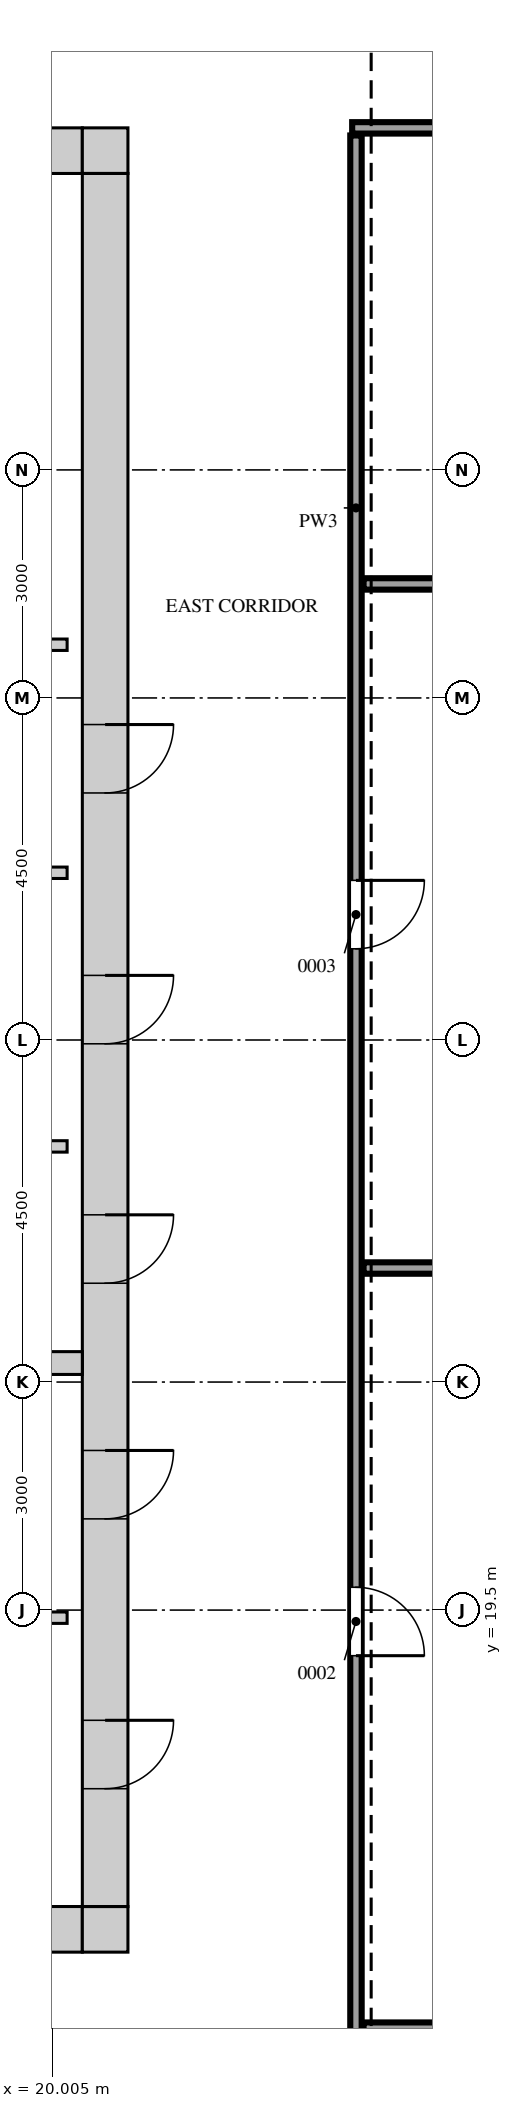
"""IFC4 building model, lengths in metres.
Left out: names, types, materials, properties, quantities, classifications, styles, units other than length and angle.
Written with IfcOpenShell. Run it as: python <this file> out.ifc"""

import sys

from ifc_helpers import new_model, si_unit, direction, frame, frame_2d, origin, place, context, subcontext, project, spatial, rectangle, extrude, source, transform, mapped, element, fill, save


model = new_model("IFC4")
c1 = context("Model", 3, precision=1e-05, world=origin(), true_north=direction((0.0, 1.0)))
c2 = subcontext(c1, "Body", "Model", "MODEL_VIEW")
j1 = project(units=[si_unit("LENGTHUNIT", "METRE"), si_unit("PLANEANGLEUNIT", "RADIAN")], contexts=[c1])
p1 = place(None, origin())
s1 = spatial("IfcSite", under=j1, at=p1, CompositionType="ELEMENT")
p2 = place(p1, origin())
s2 = spatial("IfcBuilding", under=s1, at=p2, CompositionType="ELEMENT")
p3 = place(p2, frame((0.0, 0.0, 334.7)))
s3 = spatial("IfcBuildingStorey", under=s2, at=p3, CompositionType="ELEMENT", Elevation=334.7)
m1 = source(origin(), c2, "Body", "SweptSolid", [
    extrude(rectangle(XDim=14.4, YDim=0.6, at=frame_2d((7.2, 0.0))), origin(), (0.0, 0.0, 1.0), 4.25),
])
p4 = place(p3, frame((6.0, 38.7, 0.0), z_axis=(0.0, 0.0, 1.0), x_axis=(1.0, 0.0, 0.0)))
e1 = element("IfcWall", 1, at=p4, inside=s3, PredefinedType="SHEAR", context=c2, shape_type="MappedRepresentation", body=[
    mapped(m1, transform((0.0, 0.0, 0.0))),
])
m2 = source(origin(), c2, "Body", "SweptSolid", [
    extrude(rectangle(XDim=0.9, YDim=2.1, at=frame_2d((0.45, 1.05))), frame((0.0, 0.31, 0.0), z_axis=(0.0, -1.0, 0.0), x_axis=(1.0, 0.0, 0.0)), (0.0, 0.0, 1.0), 0.62),
])
p5 = place(p4, frame((3.7, 0.0, 0.0)))
e2 = element("IfcOpeningElement", 2, at=p5, cuts=e1, PredefinedType="OPENING", context=c2, shape_type="MappedRepresentation", body=[
    mapped(m2, transform((0.0, 0.0, 0.0))),
])
p6 = place(p4, frame((10.4, 0.0, 0.0)))
e3 = element("IfcOpeningElement", 3, at=p6, cuts=e1, PredefinedType="OPENING", context=c2, shape_type="MappedRepresentation", body=[
    mapped(m2, transform((0.0, 0.0, 0.0))),
])
m3 = source(origin(), c2, "Body", "SweptSolid", [
    extrude(rectangle(XDim=0.6, YDim=0.6, at=frame_2d((0.3, 0.0))), origin(), (0.0, 0.0, 1.0), 4.25),
])
p7 = place(p3, frame((20.4, 38.7, 0.0), z_axis=(0.0, 0.0, 1.0), x_axis=(1.0, 0.0, 0.0)))
e4 = element("IfcWall", 4, at=p7, inside=s3, PredefinedType="SHEAR", context=c2, shape_type="MappedRepresentation", body=[
    mapped(m3, transform((0.0, 0.0, 0.0))),
])
p8 = place(p3, frame((6.0, 15.3, 0.0), z_axis=(0.0, 0.0, 1.0), x_axis=(1.0, 0.0, 0.0)))
e5 = element("IfcWall", 5, at=p8, inside=s3, PredefinedType="SHEAR", context=c2, shape_type="MappedRepresentation", body=[
    mapped(m1, transform((0.0, 0.0, 0.0))),
])
m4 = source(origin(), c2, "Body", "SweptSolid", [
    extrude(rectangle(XDim=1.2, YDim=2.1, at=frame_2d((0.6, 1.05))), frame((0.0, 0.31, 0.0), z_axis=(0.0, -1.0, 0.0), x_axis=(1.0, 0.0, 0.0)), (0.0, 0.0, 1.0), 0.62),
])
p9 = place(p8, frame((6.2, 0.0, 0.0)))
e6 = element("IfcOpeningElement", 6, at=p9, cuts=e5, PredefinedType="OPENING", context=c2, shape_type="MappedRepresentation", body=[
    mapped(m4, transform((0.0, 0.0, 0.0))),
])
p10 = place(p8, frame((2.85, 0.0, 0.0)))
e7 = element("IfcOpeningElement", 7, at=p10, cuts=e5, PredefinedType="OPENING", context=c2, shape_type="MappedRepresentation", body=[
    mapped(m4, transform((0.0, 0.0, 0.0))),
])
m5 = source(origin(), c2, "Body", "SweptSolid", [
    extrude(rectangle(XDim=1.0, YDim=2.1, at=frame_2d((0.5, 1.05))), frame((0.0, 0.31, 0.0), z_axis=(0.0, -1.0, 0.0), x_axis=(1.0, 0.0, 0.0)), (0.0, 0.0, 1.0), 0.62),
])
p11 = place(p8, frame((8.7, 0.0, 0.0)))
e8 = element("IfcOpeningElement", 8, at=p11, cuts=e5, PredefinedType="OPENING", context=c2, shape_type="MappedRepresentation", body=[
    mapped(m5, transform((0.0, 0.0, 0.0))),
])
p12 = place(p3, frame((20.4, 15.3, 0.0), z_axis=(0.0, 0.0, 1.0), x_axis=(1.0, 0.0, 0.0)))
e9 = element("IfcWall", 9, at=p12, inside=s3, PredefinedType="SHEAR", context=c2, shape_type="MappedRepresentation", body=[
    mapped(m3, transform((0.0, 0.0, 0.0))),
])
m6 = source(origin(), c2, "Body", "SweptSolid", [
    extrude(rectangle(XDim=22.8, YDim=0.6, at=frame_2d((11.4, 0.0))), origin(), (0.0, 0.0, 1.0), 4.25),
])
p13 = place(p3, frame((20.7, 15.6, 0.0), z_axis=(0.0, 0.0, 1.0), x_axis=(0.0, 1.0, 0.0)))
e10 = element("IfcWall", 10, at=p13, inside=s3, PredefinedType="SHEAR", context=c2, shape_type="MappedRepresentation", body=[
    mapped(m6, transform((0.0, 0.0, 0.0))),
])
p14 = place(p13, frame((8.2, 0.0, 0.0)))
e11 = element("IfcOpeningElement", 11, at=p14, cuts=e10, PredefinedType="OPENING", context=c2, shape_type="MappedRepresentation", body=[
    mapped(m2, transform((0.0, 0.0, 0.0))),
])
p15 = place(p13, frame((11.35, 0.0, 0.0)))
e12 = element("IfcOpeningElement", 12, at=p15, cuts=e10, PredefinedType="OPENING", context=c2, shape_type="MappedRepresentation", body=[
    mapped(m2, transform((0.0, 0.0, 0.0))),
])
p16 = place(p13, frame((14.65, 0.0, 0.0)))
e13 = element("IfcOpeningElement", 13, at=p16, cuts=e10, PredefinedType="OPENING", context=c2, shape_type="MappedRepresentation", body=[
    mapped(m2, transform((0.0, 0.0, 0.0))),
])
p17 = place(p13, frame((1.55, 0.0, 0.0)))
e14 = element("IfcOpeningElement", 14, at=p17, cuts=e10, PredefinedType="OPENING", context=c2, shape_type="MappedRepresentation", body=[
    mapped(m2, transform((0.0, 0.0, 0.0))),
])
p18 = place(p13, frame((5.1, 0.0, 0.0)))
e15 = element("IfcOpeningElement", 15, at=p18, cuts=e10, PredefinedType="OPENING", context=c2, shape_type="MappedRepresentation", body=[
    mapped(m2, transform((0.0, 0.0, 0.0))),
])
m7 = source(origin(), c2, "Body", "SweptSolid", [
    extrude(rectangle(XDim=13.2, YDim=0.3, at=frame_2d((6.6, 0.0))), origin(), (0.0, 0.0, 1.0), 4.25),
])
p19 = place(p3, frame((7.2, 22.75, 0.0), z_axis=(0.0, 0.0, 1.0), x_axis=(1.0, 0.0, 0.0)))
e16 = element("IfcWall", 16, at=p19, inside=s3, PredefinedType="STANDARD", context=c2, shape_type="MappedRepresentation", body=[
    mapped(m7, transform((0.0, 0.0, 0.0))),
])
m8 = source(origin(), c2, "Body", "SweptSolid", [
    extrude(rectangle(XDim=32.6, YDim=0.15, at=frame_2d((16.3, 0.0))), origin(), (0.0, 0.0, 1.0), 4.3),
])
p20 = place(p3, frame((24.0, 6.3, 0.0), z_axis=(0.0, 0.0, 1.0), x_axis=(0.0, 1.0, 0.0)))
e17 = element("IfcWall", 17, at=p20, inside=s3, PredefinedType="PARTITIONING", context=c2, shape_type="MappedRepresentation", body=[
    mapped(m8, transform((0.0, 0.0, 0.0))),
])
m9 = source(origin(), c2, "Body", "SweptSolid", [
    extrude(rectangle(XDim=0.9, YDim=2.1, at=frame_2d((0.45, 1.05))), frame((0.0, 0.085, 0.0), z_axis=(0.0, -1.0, 0.0), x_axis=(1.0, 0.0, 0.0)), (0.0, 0.0, 1.0), 0.17),
])
p21 = place(p20, frame((3.1, 0.0, 0.0)))
e18 = element("IfcOpeningElement", 18, at=p21, cuts=e17, PredefinedType="OPENING", context=c2, shape_type="MappedRepresentation", body=[
    mapped(m9, transform((0.0, 0.0, 0.0))),
])
p22 = place(p20, frame((12.6, 0.0, 0.0)))
e19 = element("IfcOpeningElement", 19, at=p22, cuts=e17, PredefinedType="OPENING", context=c2, shape_type="MappedRepresentation", body=[
    mapped(m9, transform((0.0, 0.0, 0.0))),
])
p23 = place(p20, frame((21.9, 0.0, 0.0)))
e20 = element("IfcOpeningElement", 20, at=p23, cuts=e17, PredefinedType="OPENING", context=c2, shape_type="MappedRepresentation", body=[
    mapped(m9, transform((0.0, 0.0, 0.0))),
])
m10 = source(origin(), c2, "Body", "SweptSolid", [
    extrude(rectangle(XDim=11.0, YDim=0.15, at=frame_2d((5.5, 0.0))), origin(), (0.0, 0.0, 1.0), 4.3),
])
p24 = place(p3, frame((24.1, 14.0, 0.0), z_axis=(0.0, 0.0, 1.0), x_axis=(1.0, 0.0, 0.0)))
e21 = element("IfcWall", 21, at=p24, inside=s3, PredefinedType="PARTITIONING", context=c2, shape_type="MappedRepresentation", body=[
    mapped(m10, transform((0.0, 0.0, 0.0))),
])
m11 = source(origin(), c2, "Body", "SweptSolid", [
    extrude(rectangle(XDim=4.1, YDim=0.15, at=frame_2d((2.05, 0.0))), origin(), (0.0, 0.0, 1.0), 4.3),
])
p25 = place(p3, frame((16.1, 19.4, 0.0), z_axis=(0.0, 0.0, 1.0), x_axis=(1.0, 0.0, 0.0)))
e22 = element("IfcWall", 22, at=p25, inside=s3, PredefinedType="PARTITIONING", context=c2, shape_type="MappedRepresentation", body=[
    mapped(m11, transform((0.0, 0.0, 0.0))),
])
p26 = place(p3, frame((24.1, 24.0, 0.0), z_axis=(0.0, 0.0, 1.0), x_axis=(1.0, 0.0, 0.0)))
e23 = element("IfcWall", 23, at=p26, inside=s3, PredefinedType="PARTITIONING", context=c2, shape_type="MappedRepresentation", body=[
    mapped(m10, transform((0.0, 0.0, 0.0))),
])
m12 = source(origin(), c2, "Body", "SweptSolid", [
    extrude(rectangle(XDim=13.4, YDim=0.15, at=frame_2d((6.7, 0.0))), origin(), (0.0, 0.0, 1.0), 4.3),
])
for number, where, z_axis, x_axis in (
    (24, (6.8, 25.6, 0.0), (0.0, 0.0, 1.0), (1.0, 0.0, 0.0)),
    (25, (6.8, 29.2, 0.0), (0.0, 0.0, 1.0), (1.0, 0.0, 0.0)),
    (26, (6.8, 32.2, 0.0), (0.0, 0.0, 1.0), (1.0, 0.0, 0.0)),
):
    element("IfcWall", number, at=place(p3, frame(where, z_axis=z_axis, x_axis=x_axis)), inside=s3, PredefinedType="PARTITIONING", context=c2, shape_type="MappedRepresentation", body=[
        mapped(m12, transform((0.0, 0.0, 0.0))),
    ])
p27 = place(p3, frame((24.1, 33.0, 0.0), z_axis=(0.0, 0.0, 1.0), x_axis=(1.0, 0.0, 0.0)))
e27 = element("IfcWall", 27, at=p27, inside=s3, PredefinedType="PARTITIONING", context=c2, shape_type="MappedRepresentation", body=[
    mapped(m10, transform((0.0, 0.0, 0.0))),
])
m13 = source(origin(), c2, "Body", "SweptSolid", [
    extrude(rectangle(XDim=11.15, YDim=0.15, at=frame_2d((5.575, 0.0))), origin(), (0.0, 0.0, 1.0), 4.3),
])
p28 = place(p3, frame((23.95, 39.0, 0.0), z_axis=(0.0, 0.0, 1.0), x_axis=(1.0, 0.0, 0.0)))
e28 = element("IfcWall", 28, at=p28, inside=s3, PredefinedType="PARTITIONING", context=c2, shape_type="MappedRepresentation", body=[
    mapped(m13, transform((0.0, 0.0, 0.0))),
])
p29 = place(p28, frame((2.95, 0.0, 0.0)))
e29 = element("IfcOpeningElement", 29, at=p29, cuts=e28, PredefinedType="OPENING", context=c2, shape_type="MappedRepresentation", body=[
    mapped(m9, transform((0.0, 0.0, 0.0))),
])
m14 = source(origin(), c2, "Body", "SweptSolid", [
    extrude(rectangle(XDim=0.9, YDim=2.1, at=frame_2d((0.45, 1.05))), frame((0.0, 0.25, 0.0), z_axis=(0.0, -1.0, 0.0), x_axis=(1.0, 0.0, 0.0)), (0.0, 0.0, 1.0), 0.5),
])
p30 = place(p14, origin())
e30 = element("IfcDoor", 30, at=p30, inside=s3, OperationType="SINGLE_SWING_RIGHT", PredefinedType="DOOR", context=c2, shape_type="MappedRepresentation", body=[
    mapped(m14, transform((0.0, 0.0, 0.0))),
])
fill(e11, e30)
p31 = place(p15, origin())
e31 = element("IfcDoor", 31, at=p31, inside=s3, OperationType="SINGLE_SWING_RIGHT", PredefinedType="DOOR", context=c2, shape_type="MappedRepresentation", body=[
    mapped(m14, transform((0.0, 0.0, 0.0))),
])
fill(e12, e31)
p32 = place(p16, origin())
e32 = element("IfcDoor", 32, at=p32, inside=s3, OperationType="SINGLE_SWING_RIGHT", PredefinedType="DOOR", context=c2, shape_type="MappedRepresentation", body=[
    mapped(m14, transform((0.0, 0.0, 0.0))),
])
fill(e13, e32)
m15 = source(origin(), c2, "Body", "SweptSolid", [
    extrude(rectangle(XDim=0.9, YDim=2.1, at=frame_2d((0.45, 1.05))), frame((0.0, 0.025, 0.0), z_axis=(0.0, -1.0, 0.0), x_axis=(1.0, 0.0, 0.0)), (0.0, 0.0, 1.0), 0.05),
])
p33 = place(p22, origin())
e33 = element("IfcDoor", 33, at=p33, inside=s3, OperationType="SINGLE_SWING_LEFT", PredefinedType="DOOR", context=c2, shape_type="MappedRepresentation", body=[
    mapped(m15, transform((0.0, 0.0, 0.0))),
])
fill(e19, e33)
p34 = place(p23, origin())
e34 = element("IfcDoor", 34, at=p34, inside=s3, OperationType="SINGLE_SWING_RIGHT", PredefinedType="DOOR", context=c2, shape_type="MappedRepresentation", body=[
    mapped(m15, transform((0.0, 0.0, 0.0))),
])
fill(e20, e34)
p35 = place(p17, origin())
e35 = element("IfcDoor", 35, at=p35, inside=s3, OperationType="SINGLE_SWING_RIGHT", PredefinedType="DOOR", context=c2, shape_type="MappedRepresentation", body=[
    mapped(m14, transform((0.0, 0.0, 0.0))),
])
fill(e14, e35)
p36 = place(p18, origin())
e36 = element("IfcDoor", 36, at=p36, inside=s3, OperationType="SINGLE_SWING_RIGHT", PredefinedType="DOOR", context=c2, shape_type="MappedRepresentation", body=[
    mapped(m14, transform((0.0, 0.0, 0.0))),
])
fill(e15, e36)
save(model, sys.argv[1])
